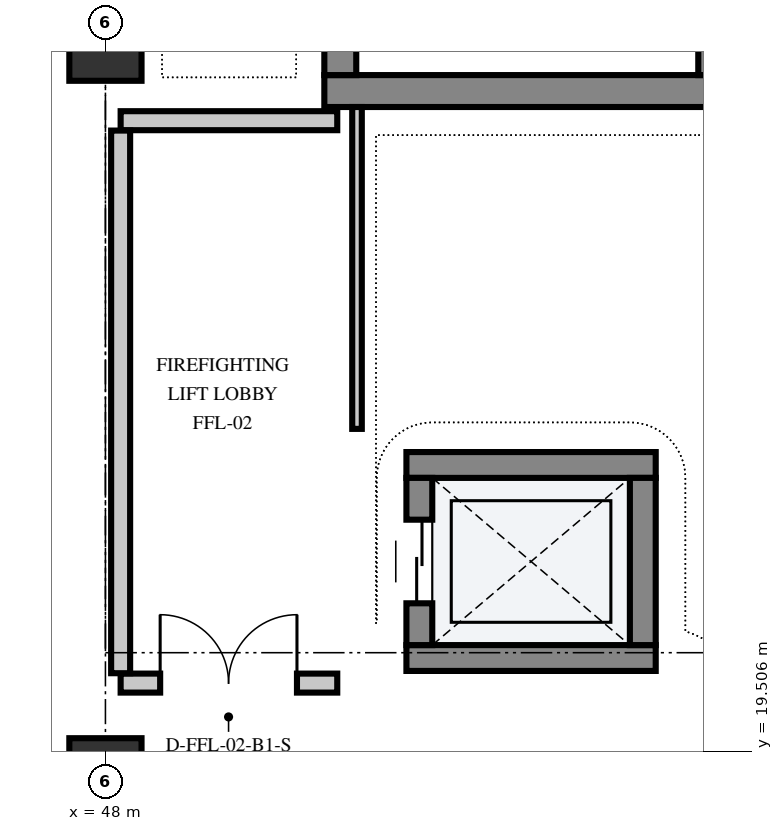
"""IFC4 building model, lengths in metres.
Left out: names, types, materials, properties, quantities, classifications, styles, units other than length and angle.
Written with IfcOpenShell. Run it as: python <this file> out.ifc"""

import sys

from ifc_helpers import new_model, si_unit, direction, frame, frame_2d, origin, origin_2d, place, context, subcontext, project, spatial, rectangle, extrude, element, fill, save


model = new_model("IFC4")
c1 = context("Model", 3, precision=1e-05, world=origin(), true_north=direction((0.0, 1.0)))
c2 = subcontext(c1, "Body", "Model", "MODEL_VIEW")
j1 = project(units=[si_unit("LENGTHUNIT", "METRE"), si_unit("PLANEANGLEUNIT", "RADIAN")], contexts=[c1])
p1 = place(None, origin())
s1 = spatial("IfcSite", under=j1, at=p1, CompositionType="ELEMENT")
p2 = place(p1, origin())
s2 = spatial("IfcBuilding", under=s1, at=p2, CompositionType="ELEMENT")
p3 = place(p2, frame((0.0, 0.0, -4.8)))
s3 = spatial("IfcBuildingStorey", under=s2, at=p3, CompositionType="ELEMENT", Elevation=-4.8)
for number, where, z_axis, x_axis in (
    (1, (48.0, 19.2, 0.0), (0.0, 0.0, 1.0), (1.0, 0.0, 0.0)),
    (2, (48.0, 28.8, 0.0), (0.0, 0.0, 1.0), (1.0, 0.0, 0.0)),
):
    element("IfcColumn", number, at=place(p3, frame(where, z_axis=z_axis, x_axis=x_axis)), inside=s3, PredefinedType="COLUMN", context=c2, shape_type="SweptSolid", body=[
        extrude(rectangle(XDim=0.95, YDim=0.95, at=origin_2d()), origin(), (0.0, 0.0, 1.0), 4.8),
    ])
p4 = place(p3, frame((50.88, 28.19, 0.0), z_axis=(0.0, 0.0, 1.0), x_axis=(1.0, 0.0, 0.0)))
e3 = element("IfcWall", 3, at=p4, inside=s3, PredefinedType="SHEAR", context=c2, shape_type="SweptSolid", body=[
    extrude(rectangle(XDim=5.34, YDim=0.42, at=frame_2d((2.67, 0.0))), origin(), (0.0, 0.0, 1.0), 4.5),
])
p5 = place(p3, frame((56.01, 28.4, 0.0), z_axis=(0.0, 0.0, 1.0), x_axis=(0.0, 1.0, 0.0)))
e4 = element("IfcWall", 4, at=p5, inside=s3, PredefinedType="SHEAR", context=c2, shape_type="SweptSolid", body=[
    extrude(rectangle(XDim=8.8, YDim=0.42, at=frame_2d((4.4, 0.0))), origin(), (0.0, 0.0, 1.0), 4.5),
])
p6 = place(p3, frame((51.09, 28.4, 0.0), z_axis=(0.0, 0.0, 1.0), x_axis=(0.0, 1.0, 0.0)))
e5 = element("IfcWall", 5, at=p6, inside=s3, PredefinedType="SHEAR", context=c2, shape_type="SweptSolid", body=[
    extrude(rectangle(XDim=8.8, YDim=0.42, at=frame_2d((4.4, 0.0))), origin(), (0.0, 0.0, 1.0), 4.5),
])
p7 = place(p6, frame((0.45, 0.0, 0.0)))
e6 = element("IfcOpeningElement", 6, at=p7, cuts=e5, PredefinedType="OPENING", context=c2, shape_type="SweptSolid", body=[
    extrude(rectangle(XDim=1.35, YDim=2.2, at=frame_2d((0.675, 1.1))), frame((0.0, 0.222, 0.0), z_axis=(0.0, -1.0, 0.0), x_axis=(1.0, 0.0, 0.0)), (0.0, 0.0, 1.0), 0.444),
])
for number, where, z_axis, x_axis in (
    (7, (51.96, 20.73, 0.0), (0.0, 0.0, 1.0), (1.0, 0.0, 0.0)),
    (8, (51.96, 23.27, 0.0), (0.0, 0.0, 1.0), (1.0, 0.0, 0.0)),
):
    element("IfcWall", number, at=place(p3, frame(where, z_axis=z_axis, x_axis=x_axis)), inside=s3, PredefinedType="SHEAR", context=c2, shape_type="SweptSolid", body=[
        extrude(rectangle(XDim=3.28, YDim=0.34, at=frame_2d((1.64, 0.0))), origin(), (0.0, 0.0, 1.0), 4.5),
    ])
p8 = place(p3, frame((52.13, 20.9, 0.0), z_axis=(0.0, 0.0, 1.0), x_axis=(0.0, 1.0, 0.0)))
e9 = element("IfcWall", 9, at=p8, inside=s3, PredefinedType="SHEAR", context=c2, shape_type="SweptSolid", body=[
    extrude(rectangle(XDim=2.2, YDim=0.34, at=frame_2d((1.1, 0.0))), origin(), (0.0, 0.0, 1.0), 4.5),
])
p9 = place(p8, frame((0.55, 0.0, 0.0)))
e10 = element("IfcOpeningElement", 10, at=p9, cuts=e9, PredefinedType="OPENING", context=c2, shape_type="SweptSolid", body=[
    extrude(rectangle(XDim=1.1, YDim=2.15, at=frame_2d((0.55, 1.075))), frame((0.0, 0.182, 0.0), z_axis=(0.0, -1.0, 0.0), x_axis=(1.0, 0.0, 0.0)), (0.0, 0.0, 1.0), 0.364),
])
p10 = place(p3, frame((55.07, 20.9, 0.0), z_axis=(0.0, 0.0, 1.0), x_axis=(0.0, 1.0, 0.0)))
e11 = element("IfcWall", 11, at=p10, inside=s3, PredefinedType="SHEAR", context=c2, shape_type="SweptSolid", body=[
    extrude(rectangle(XDim=2.2, YDim=0.34, at=frame_2d((1.1, 0.0))), origin(), (0.0, 0.0, 1.0), 4.5),
])
p11 = place(p3, frame((48.2, 20.4, 0.0), z_axis=(0.0, 0.0, 1.0), x_axis=(1.0, 0.0, 0.0)))
e12 = element("IfcWall", 12, at=p11, inside=s3, PredefinedType="PARTITIONING", context=c2, shape_type="SweptSolid", body=[
    extrude(rectangle(XDim=2.85, YDim=0.25, at=frame_2d((1.425, 0.0))), origin(), (0.0, 0.0, 1.0), 3.44),
])
p12 = place(p11, frame((0.52, 0.0, 0.0)))
e13 = element("IfcOpeningElement", 13, at=p12, cuts=e12, PredefinedType="OPENING", context=c2, shape_type="SweptSolid", body=[
    extrude(rectangle(XDim=1.8, YDim=2.25, at=frame_2d((0.9, 1.125))), frame((0.0, 0.137, 0.0), z_axis=(0.0, -1.0, 0.0), x_axis=(1.0, 0.0, 0.0)), (0.0, 0.0, 1.0), 0.274),
])
p13 = place(p3, frame((48.2, 27.8, 0.0), z_axis=(0.0, 0.0, 1.0), x_axis=(1.0, 0.0, 0.0)))
e14 = element("IfcWall", 14, at=p13, inside=s3, PredefinedType="PARTITIONING", context=c2, shape_type="SweptSolid", body=[
    extrude(rectangle(XDim=2.85, YDim=0.25, at=frame_2d((1.425, 0.0))), origin(), (0.0, 0.0, 1.0), 3.44),
])
p14 = place(p3, frame((48.2, 20.53, 0.0), z_axis=(0.0, 0.0, 1.0), x_axis=(0.0, 1.0, 0.0)))
e15 = element("IfcWall", 15, at=p14, inside=s3, PredefinedType="PARTITIONING", context=c2, shape_type="SweptSolid", body=[
    extrude(rectangle(XDim=7.14, YDim=0.25, at=frame_2d((3.57, 0.0))), origin(), (0.0, 0.0, 1.0), 3.44),
])
p15 = place(p3, frame((51.31, 23.745, 0.0), z_axis=(0.0, 0.0, 1.0), x_axis=(0.0, 1.0, 0.0)))
e16 = element("IfcWall", 16, at=p15, inside=s3, PredefinedType="PARTITIONING", context=c2, shape_type="SweptSolid", body=[
    extrude(rectangle(XDim=4.235, YDim=0.126, at=frame_2d((2.118, 0.0))), origin(), (0.0, 0.0, 1.0), 4.5),
])
p16 = place(p9, origin())
e17 = element("IfcDoor", 17, at=p16, inside=s3, OperationType="DOUBLE_DOOR_SLIDING", PredefinedType="DOOR", context=c2, shape_type="SweptSolid", body=[
    extrude(rectangle(XDim=1.1, YDim=2.15, at=frame_2d((0.55, 1.075))), frame((0.0, 0.025, 0.0), z_axis=(0.0, -1.0, 0.0), x_axis=(1.0, 0.0, 0.0)), (0.0, 0.0, 1.0), 0.05),
])
fill(e10, e17)
p17 = place(p12, origin())
e18 = element("IfcDoor", 18, at=p17, inside=s3, OperationType="DOUBLE_DOOR_SINGLE_SWING", PredefinedType="DOOR", context=c2, shape_type="SweptSolid", body=[
    extrude(rectangle(XDim=1.8, YDim=2.25, at=frame_2d((0.9, 1.125))), frame((0.0, 0.025, 0.0), z_axis=(0.0, -1.0, 0.0), x_axis=(1.0, 0.0, 0.0)), (0.0, 0.0, 1.0), 0.05),
])
fill(e13, e18)
save(model, sys.argv[1])
